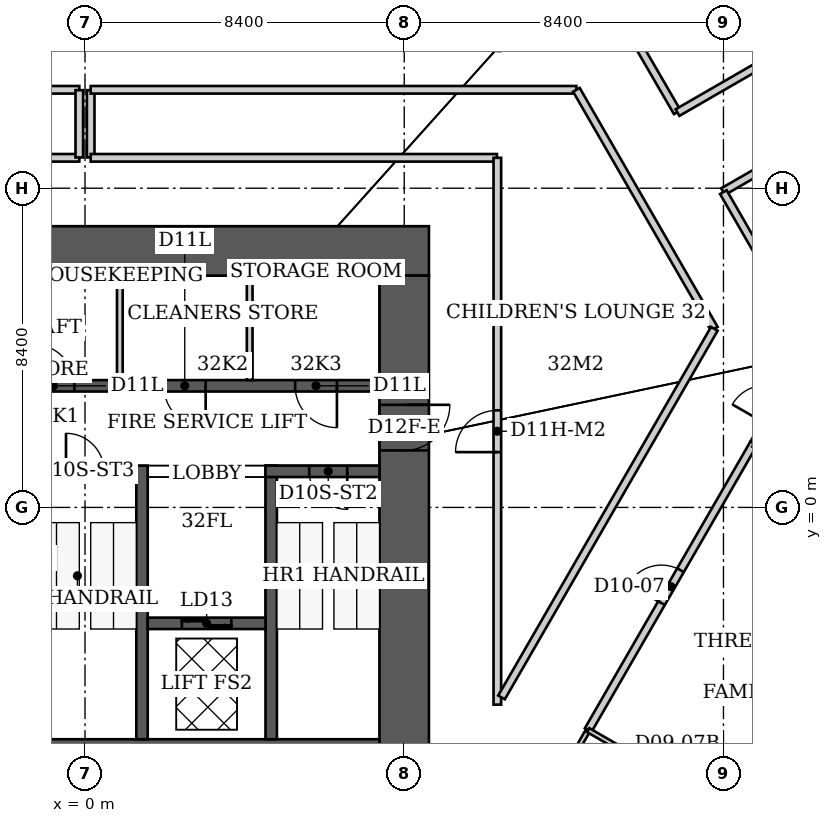
"""IFC4 building model, lengths in metres.
Left out: names, types, materials, properties, quantities, classifications, styles, units other than length and angle.
Written with IfcOpenShell. Run it as: python <this file> out.ifc"""

import sys

from ifc_helpers import new_model, si_unit, direction, frame, frame_2d, origin, place, context, subcontext, project, spatial, rectangle, extrude, element, fill, save


model = new_model("IFC4")
c1 = context("Model", 3, precision=1e-05, world=origin(), true_north=direction((0.0, 1.0)))
c2 = subcontext(c1, "Body", "Model", "MODEL_VIEW")
j1 = project(units=[si_unit("LENGTHUNIT", "METRE"), si_unit("PLANEANGLEUNIT", "RADIAN")], contexts=[c1])
p1 = place(None, origin())
s1 = spatial("IfcSite", under=j1, at=p1, CompositionType="ELEMENT")
p2 = place(p1, origin())
s2 = spatial("IfcBuilding", under=s1, at=p2, CompositionType="ELEMENT")
p3 = place(p2, frame((0.0, 0.0, 131.0)))
s3 = spatial("IfcBuildingStorey", under=s2, at=p3, CompositionType="ELEMENT", Elevation=131.0)
p4 = place(p3, frame((-9.05, 6.75, 0.0), z_axis=(0.0, 0.0, 1.0), x_axis=(1.0, 0.0, 0.0)))
e1 = element("IfcWall", 1, at=p4, inside=s3, PredefinedType="SHEAR", context=c2, shape_type="SweptSolid", body=[
    extrude(rectangle(XDim=18.1, YDim=1.3, at=frame_2d((9.05, 0.0))), origin(), (0.0, 0.0, 1.0), 3.8),
])
p5 = place(p3, frame((8.4, -9.2, 0.0), z_axis=(0.0, 0.0, 1.0), x_axis=(0.0, 1.0, 0.0)))
e2 = element("IfcWall", 2, at=p5, inside=s3, PredefinedType="SHEAR", context=c2, shape_type="SweptSolid", body=[
    extrude(rectangle(XDim=15.3, YDim=1.3, at=frame_2d((7.65, 0.0))), origin(), (0.0, 0.0, 1.0), 3.8),
])
p6 = place(p5, frame((10.7, 0.0, 0.0)))
e3 = element("IfcOpeningElement", 3, at=p6, cuts=e2, PredefinedType="OPENING", context=c2, shape_type="SweptSolid", body=[
    extrude(rectangle(XDim=1.2, YDim=2.2, at=frame_2d((0.6, 1.1))), frame((0.0, 0.65, 0.0), z_axis=(0.0, -1.0, 0.0), x_axis=(1.0, 0.0, 0.0)), (0.0, 0.0, 1.0), 1.3),
])
p7 = place(p3, frame((-7.75, -6.5, 0.0), z_axis=(0.0, 0.0, 1.0), x_axis=(1.0, 0.0, 0.0)))
e4 = element("IfcWall", 4, at=p7, inside=s3, PredefinedType="SHEAR", context=c2, shape_type="SweptSolid", body=[
    extrude(rectangle(XDim=15.5, YDim=0.8, at=frame_2d((7.75, 0.0))), origin(), (0.0, 0.0, 1.0), 3.8),
])
for number, where, z_axis, x_axis in (
    (5, (1.5, -6.1, 0.0), (0.0, 0.0, 1.0), (0.0, 1.0, 0.0)),
    (6, (4.9, -6.1, 0.0), (0.0, 0.0, 1.0), (0.0, 1.0, 0.0)),
):
    element("IfcWall", number, at=place(p3, frame(where, z_axis=z_axis, x_axis=x_axis)), inside=s3, PredefinedType="SHEAR", context=c2, shape_type="SweptSolid", body=[
        extrude(rectangle(XDim=7.2, YDim=0.3, at=frame_2d((3.6, 0.0))), origin(), (0.0, 0.0, 1.0), 3.8),
    ])
p8 = place(p3, frame((-1.35, 0.95, 0.0), z_axis=(0.0, 0.0, 1.0), x_axis=(1.0, 0.0, 0.0)))
e7 = element("IfcWall", 7, at=p8, inside=s3, PredefinedType="SHEAR", context=c2, shape_type="SweptSolid", body=[
    extrude(rectangle(XDim=2.7, YDim=0.3, at=frame_2d((1.35, 0.0))), origin(), (0.0, 0.0, 1.0), 3.8),
])
p9 = place(p8, frame((0.85, 0.0, 0.0)))
e8 = element("IfcOpeningElement", 8, at=p9, cuts=e7, PredefinedType="OPENING", context=c2, shape_type="SweptSolid", body=[
    extrude(rectangle(XDim=1.0, YDim=2.2, at=frame_2d((0.5, 1.1))), frame((0.0, 0.15, 0.0), z_axis=(0.0, -1.0, 0.0), x_axis=(1.0, 0.0, 0.0)), (0.0, 0.0, 1.0), 0.3),
])
p10 = place(p3, frame((4.75, 0.95, 0.0), z_axis=(0.0, 0.0, 1.0), x_axis=(1.0, 0.0, 0.0)))
e9 = element("IfcWall", 9, at=p10, inside=s3, PredefinedType="SHEAR", context=c2, shape_type="SweptSolid", body=[
    extrude(rectangle(XDim=3.0, YDim=0.3, at=frame_2d((1.5, 0.0))), origin(), (0.0, 0.0, 1.0), 3.8),
])
p11 = place(p10, frame((1.15, 0.0, 0.0)))
e10 = element("IfcOpeningElement", 10, at=p11, cuts=e9, PredefinedType="OPENING", context=c2, shape_type="SweptSolid", body=[
    extrude(rectangle(XDim=1.0, YDim=2.2, at=frame_2d((0.5, 1.1))), frame((0.0, 0.15, 0.0), z_axis=(0.0, -1.0, 0.0), x_axis=(1.0, 0.0, 0.0)), (0.0, 0.0, 1.0), 0.3),
])
p12 = place(p3, frame((1.65, -3.05, 0.0), z_axis=(0.0, 0.0, 1.0), x_axis=(1.0, 0.0, 0.0)))
e11 = element("IfcWall", 11, at=p12, inside=s3, PredefinedType="SHEAR", context=c2, shape_type="SweptSolid", body=[
    extrude(rectangle(XDim=3.1, YDim=0.3, at=frame_2d((1.55, 0.0))), origin(), (0.0, 0.0, 1.0), 3.8),
])
p13 = place(p12, frame((0.9, 0.0, 0.0)))
e12 = element("IfcOpeningElement", 12, at=p13, cuts=e11, PredefinedType="OPENING", context=c2, shape_type="SweptSolid", body=[
    extrude(rectangle(XDim=1.3, YDim=2.1, at=frame_2d((0.65, 1.05))), frame((0.0, 0.15, 0.0), z_axis=(0.0, -1.0, 0.0), x_axis=(1.0, 0.0, 0.0)), (0.0, 0.0, 1.0), 0.3),
])
p14 = place(p3, frame((-7.75, 3.2, 0.0), z_axis=(0.0, 0.0, 1.0), x_axis=(1.0, 0.0, 0.0)))
e13 = element("IfcWall", 13, at=p14, inside=s3, PredefinedType="SHEAR", context=c2, shape_type="SweptSolid", body=[
    extrude(rectangle(XDim=15.5, YDim=0.3, at=frame_2d((7.75, 0.0))), origin(), (0.0, 0.0, 1.0), 3.8),
])
p15 = place(p14, frame((6.371, 0.0, 0.0)))
e14 = element("IfcOpeningElement", 14, at=p15, cuts=e13, PredefinedType="OPENING", context=c2, shape_type="SweptSolid", body=[
    extrude(rectangle(XDim=1.1, YDim=2.2, at=frame_2d((0.55, 1.1))), frame((0.0, 0.15, 0.0), z_axis=(0.0, -1.0, 0.0), x_axis=(1.0, 0.0, 0.0)), (0.0, 0.0, 1.0), 0.3),
])
p16 = place(p14, frame((9.825, 0.0, 0.0)))
e15 = element("IfcOpeningElement", 15, at=p16, cuts=e13, PredefinedType="OPENING", context=c2, shape_type="SweptSolid", body=[
    extrude(rectangle(XDim=1.1, YDim=2.2, at=frame_2d((0.55, 1.1))), frame((0.0, 0.15, 0.0), z_axis=(0.0, -1.0, 0.0), x_axis=(1.0, 0.0, 0.0)), (0.0, 0.0, 1.0), 0.3),
])
p17 = place(p14, frame((13.279, 0.0, 0.0)))
e16 = element("IfcOpeningElement", 16, at=p17, cuts=e13, PredefinedType="OPENING", context=c2, shape_type="SweptSolid", body=[
    extrude(rectangle(XDim=1.1, YDim=2.2, at=frame_2d((0.55, 1.1))), frame((0.0, 0.15, 0.0), z_axis=(0.0, -1.0, 0.0), x_axis=(1.0, 0.0, 0.0)), (0.0, 0.0, 1.0), 0.3),
])
p18 = place(p3, frame((-10.62, 10.99, 0.0), z_axis=(0.0, 0.0, 1.0), x_axis=(1.0, 0.0, 0.0)))
e17 = element("IfcWall", 17, at=p18, inside=s3, PredefinedType="PARTITIONING", context=c2, shape_type="SweptSolid", body=[
    extrude(rectangle(XDim=10.47, YDim=0.2, at=frame_2d((5.235, 0.0))), origin(), (0.0, 0.0, 1.0), 3.64),
])
p19 = place(p3, frame((-0.15, 9.2, 0.0), z_axis=(0.0, 0.0, 1.0), x_axis=(-1.0, 0.0, 0.0)))
e18 = element("IfcWall", 18, at=p19, inside=s3, PredefinedType="PARTITIONING", context=c2, shape_type="SweptSolid", body=[
    extrude(rectangle(XDim=10.69, YDim=0.2, at=frame_2d((5.345, 0.0))), origin(), (0.0, 0.0, 1.0), 3.64),
])
for number, where, z_axis, x_axis in (
    (19, (-0.15, 10.98, 0.0), (0.0, 0.0, 1.0), (0.0, -1.0, 0.0)),
    (20, (0.15, 9.21, 0.0), (0.0, 0.0, 1.0), (0.0, 1.0, 0.0)),
):
    element("IfcWall", number, at=place(p3, frame(where, z_axis=z_axis, x_axis=x_axis)), inside=s3, PredefinedType="PARTITIONING", context=c2, shape_type="SweptSolid", body=[
        extrude(rectangle(XDim=1.77, YDim=0.2, at=frame_2d((0.885, 0.0))), origin(), (0.0, 0.0, 1.0), 3.64),
    ])
p20 = place(p3, frame((0.15, 10.99, 0.0), z_axis=(0.0, 0.0, 1.0), x_axis=(1.0, 0.0, 0.0)))
e21 = element("IfcWall", 21, at=p20, inside=s3, PredefinedType="PARTITIONING", context=c2, shape_type="SweptSolid", body=[
    extrude(rectangle(XDim=12.78, YDim=0.2, at=frame_2d((6.39, 0.0))), origin(), (0.0, 0.0, 1.0), 3.64),
])
p21 = place(p3, frame((10.84, 9.2, 0.0), z_axis=(0.0, 0.0, 1.0), x_axis=(-1.0, 0.0, 0.0)))
e22 = element("IfcWall", 22, at=p21, inside=s3, PredefinedType="PARTITIONING", context=c2, shape_type="SweptSolid", body=[
    extrude(rectangle(XDim=10.69, YDim=0.2, at=frame_2d((5.345, 0.0))), origin(), (0.0, 0.0, 1.0), 3.64),
])
p22 = place(p3, frame((10.85, -5.19, 0.0), z_axis=(0.0, 0.0, 1.0), x_axis=(0.0, 1.0, 0.0)))
e23 = element("IfcWall", 23, at=p22, inside=s3, PredefinedType="PARTITIONING", context=c2, shape_type="SweptSolid", body=[
    extrude(rectangle(XDim=14.39, YDim=0.2, at=frame_2d((7.195, 0.0))), origin(), (0.0, 0.0, 1.0), 3.64),
])
p23 = place(p22, frame((6.645, 0.0, 0.0)))
e24 = element("IfcOpeningElement", 24, at=p23, cuts=e23, PredefinedType="OPENING", context=c2, shape_type="SweptSolid", body=[
    extrude(rectangle(XDim=1.1, YDim=2.2, at=frame_2d((0.55, 1.1))), frame((0.0, 0.1, 0.0), z_axis=(0.0, -1.0, 0.0), x_axis=(1.0, 0.0, 0.0)), (0.0, 0.0, 1.0), 0.2),
])
p24 = place(p3, frame((12.04, -7.94, 0.0), z_axis=(0.0, 0.0, 1.0), x_axis=(0.499737123639, 0.866177122335, 0.0)))
e25 = element("IfcWall", 25, at=p24, inside=s3, PredefinedType="PARTITIONING", context=c2, shape_type="SweptSolid", body=[
    extrude(rectangle(XDim=2.401, YDim=0.12, at=frame_2d((1.201, 0.0))), origin(), (0.0, 0.0, 1.0), 3.64),
])
p25 = place(p3, frame((12.93, 10.99, 0.0), z_axis=(0.0, 0.0, 1.0), x_axis=(0.4998524389, -0.866110581465, 0.0)))
e26 = element("IfcWall", 26, at=p25, inside=s3, PredefinedType="PARTITIONING", context=c2, shape_type="SweptSolid", body=[
    extrude(rectangle(XDim=7.262, YDim=0.2, at=frame_2d((3.631, 0.0))), origin(), (0.0, 0.0, 1.0), 3.64),
])
p26 = place(p3, frame((13.24, -5.86, 0.0), z_axis=(0.0, 0.0, 1.0), x_axis=(0.500093306236, 0.865971526701, 0.0)))
e27 = element("IfcWall", 27, at=p26, inside=s3, PredefinedType="PARTITIONING", context=c2, shape_type="SweptSolid", body=[
    extrude(rectangle(XDim=8.719, YDim=0.2, at=frame_2d((4.359, 0.0))), origin(), (0.0, 0.0, 1.0), 3.64),
])
p27 = place(p26, frame((3.859, 0.0, 0.0)))
e28 = element("IfcOpeningElement", 28, at=p27, cuts=e27, PredefinedType="OPENING", context=c2, shape_type="SweptSolid", body=[
    extrude(rectangle(XDim=1.0, YDim=2.13, at=frame_2d((0.5, 1.065))), frame((0.0, 0.1, 0.0), z_axis=(0.0, -1.0, 0.0), x_axis=(1.0, 0.0, 0.0)), (0.0, 0.0, 1.0), 0.2),
])
p28 = place(p3, frame((15.16, -6.97, 0.0), z_axis=(0.0, 0.0, 1.0), x_axis=(-0.865705017107, 0.500554515868, 0.0)))
e29 = element("IfcWall", 29, at=p28, inside=s3, PredefinedType="PARTITIONING", context=c2, shape_type="SweptSolid", body=[
    extrude(rectangle(XDim=2.218, YDim=0.12, at=frame_2d((1.109, 0.0))), origin(), (0.0, 0.0, 1.0), 3.64),
])
p29 = place(p3, frame((15.585, 10.399, 0.0), z_axis=(0.0, 0.0, 1.0), x_axis=(-0.502198411801, 0.864752424214, 0.0)))
e30 = element("IfcWall", 30, at=p29, inside=s3, PredefinedType="PARTITIONING", context=c2, shape_type="SweptSolid", body=[
    extrude(rectangle(XDim=2.997, YDim=0.2, at=frame_2d((1.498, 0.0))), origin(), (0.0, 0.0, 1.0), 3.64),
])
p30 = place(p3, frame((16.56, 4.7, 0.0), z_axis=(0.0, 0.0, 1.0), x_axis=(-0.500007375767, -0.866021145342, 0.0)))
e31 = element("IfcWall", 31, at=p30, inside=s3, PredefinedType="PARTITIONING", context=c2, shape_type="SweptSolid", body=[
    extrude(rectangle(XDim=11.2, YDim=0.2, at=frame_2d((5.6, 0.0))), origin(), (0.0, 0.0, 1.0), 3.64),
])
p31 = place(p3, frame((16.79, 8.31, 0.0), z_axis=(0.0, 0.0, 1.0), x_axis=(0.866106622958, 0.499859297871, 0.0)))
e32 = element("IfcWall", 32, at=p31, inside=s3, PredefinedType="PARTITIONING", context=c2, shape_type="SweptSolid", body=[
    extrude(rectangle(XDim=9.472, YDim=0.2, at=frame_2d((4.736, 0.0))), origin(), (0.0, 0.0, 1.0), 3.64),
])
p32 = place(p31, frame((4.186, 0.0, 0.0)))
e33 = element("IfcOpeningElement", 33, at=p32, cuts=e32, PredefinedType="OPENING", context=c2, shape_type="SweptSolid", body=[
    extrude(rectangle(XDim=1.1, YDim=2.2, at=frame_2d((0.55, 1.1))), frame((0.0, 0.1, 0.0), z_axis=(0.0, -1.0, 0.0), x_axis=(1.0, 0.0, 0.0)), (0.0, 0.0, 1.0), 0.2),
])
p33 = place(p3, frame((17.6, 1.69, 0.0), z_axis=(0.0, 0.0, 1.0), x_axis=(0.498987132006, 0.866609394187, 0.0)))
e34 = element("IfcWall", 34, at=p33, inside=s3, PredefinedType="PARTITIONING", context=c2, shape_type="SweptSolid", body=[
    extrude(rectangle(XDim=2.204, YDim=0.2, at=frame_2d((1.102, 0.0))), origin(), (0.0, 0.0, 1.0), 3.64),
])
p34 = place(p33, frame((0.602, 0.0, 0.0)))
e35 = element("IfcOpeningElement", 35, at=p34, cuts=e34, PredefinedType="OPENING", context=c2, shape_type="SweptSolid", body=[
    extrude(rectangle(XDim=1.0, YDim=2.13, at=frame_2d((0.5, 1.065))), frame((0.0, 0.1, 0.0), z_axis=(0.0, -1.0, 0.0), x_axis=(1.0, 0.0, 0.0)), (0.0, 0.0, 1.0), 0.2),
])
p35 = place(p3, frame((19.1, 4.3, 0.0), z_axis=(0.0, 0.0, 1.0), x_axis=(-0.499190874865, 0.866492048695, 0.0)))
e36 = element("IfcWall", 36, at=p35, inside=s3, PredefinedType="PARTITIONING", context=c2, shape_type="SweptSolid", body=[
    extrude(rectangle(XDim=4.613, YDim=0.2, at=frame_2d((2.307, 0.0))), origin(), (0.0, 0.0, 1.0), 3.64),
])
p36 = place(p3, frame((23.794, 15.125, 0.0), z_axis=(0.0, 0.0, 1.0), x_axis=(-0.866089024064, -0.499889790249, 0.0)))
e37 = element("IfcWall", 37, at=p36, inside=s3, PredefinedType="PARTITIONING", context=c2, shape_type="SweptSolid", body=[
    extrude(rectangle(XDim=9.472, YDim=0.2, at=frame_2d((4.736, 0.0))), origin(), (0.0, 0.0, 1.0), 3.64),
])
p37 = place(p36, frame((4.186, 0.0, 0.0)))
e38 = element("IfcOpeningElement", 38, at=p37, cuts=e37, PredefinedType="OPENING", context=c2, shape_type="SweptSolid", body=[
    extrude(rectangle(XDim=1.1, YDim=2.2, at=frame_2d((0.55, 1.1))), frame((0.0, 0.1, 0.0), z_axis=(0.0, -1.0, 0.0), x_axis=(1.0, 0.0, 0.0)), (0.0, 0.0, 1.0), 0.2),
])
p38 = place(p3, frame((24.506, -2.29, 0.0), z_axis=(0.0, 0.0, 1.0), x_axis=(-0.866414224119, 0.499325937884, 0.0)))
e39 = element("IfcWall", 39, at=p38, inside=s3, PredefinedType="PARTITIONING", context=c2, shape_type="SweptSolid", body=[
    extrude(rectangle(XDim=7.961, YDim=0.2, at=frame_2d((3.98, 0.0))), origin(), (0.0, 0.0, 1.0), 3.64),
])
for number, where, z_axis, x_axis in (
    (40, (0.917, 3.35, 0.0), (0.0, 0.0, 1.0), (0.0, 1.0, 0.0)),
    (41, (4.333, 3.35, 0.0), (0.0, 0.0, 1.0), (0.0, 1.0, 0.0)),
):
    element("IfcWall", number, at=place(p3, frame(where, z_axis=z_axis, x_axis=x_axis)), inside=s3, PredefinedType="PARTITIONING", context=c2, shape_type="SweptSolid", body=[
        extrude(rectangle(XDim=2.75, YDim=0.15, at=frame_2d((1.375, 0.0))), origin(), (0.0, 0.0, 1.0), 3.64),
    ])
p39 = place(p27, origin())
e42 = element("IfcDoor", 42, at=p39, inside=s3, OperationType="SINGLE_SWING_LEFT", PredefinedType="DOOR", context=c2, shape_type="SweptSolid", body=[
    extrude(rectangle(XDim=1.0, YDim=2.13, at=frame_2d((0.5, 1.065))), frame((0.0, 0.025, 0.0), z_axis=(0.0, -1.0, 0.0), x_axis=(1.0, 0.0, 0.0)), (0.0, 0.0, 1.0), 0.05),
])
fill(e28, e42)
p40 = place(p23, origin())
e43 = element("IfcDoor", 43, at=p40, inside=s3, OperationType="SINGLE_SWING_LEFT", PredefinedType="DOOR", context=c2, shape_type="SweptSolid", body=[
    extrude(rectangle(XDim=1.1, YDim=2.2, at=frame_2d((0.55, 1.1))), frame((0.0, 0.025, 0.0), z_axis=(0.0, -1.0, 0.0), x_axis=(1.0, 0.0, 0.0)), (0.0, 0.0, 1.0), 0.05),
])
fill(e24, e43)
p41 = place(p9, origin())
e44 = element("IfcDoor", 44, at=p41, inside=s3, OperationType="SINGLE_SWING_LEFT", PredefinedType="DOOR", context=c2, shape_type="SweptSolid", body=[
    extrude(rectangle(XDim=1.0, YDim=2.2, at=frame_2d((0.5, 1.1))), frame((0.0, 0.025, 0.0), z_axis=(0.0, -1.0, 0.0), x_axis=(1.0, 0.0, 0.0)), (0.0, 0.0, 1.0), 0.05),
])
fill(e8, e44)
p42 = place(p11, origin())
e45 = element("IfcDoor", 45, at=p42, inside=s3, OperationType="SINGLE_SWING_RIGHT", PredefinedType="DOOR", context=c2, shape_type="SweptSolid", body=[
    extrude(rectangle(XDim=1.0, YDim=2.2, at=frame_2d((0.5, 1.1))), frame((0.0, 0.025, 0.0), z_axis=(0.0, -1.0, 0.0), x_axis=(1.0, 0.0, 0.0)), (0.0, 0.0, 1.0), 0.05),
])
fill(e10, e45)
p43 = place(p6, origin())
e46 = element("IfcDoor", 46, at=p43, inside=s3, OperationType="SINGLE_SWING_RIGHT", PredefinedType="DOOR", context=c2, shape_type="SweptSolid", body=[
    extrude(rectangle(XDim=1.2, YDim=2.2, at=frame_2d((0.6, 1.1))), frame((0.0, 0.025, 0.0), z_axis=(0.0, -1.0, 0.0), x_axis=(1.0, 0.0, 0.0)), (0.0, 0.0, 1.0), 0.05),
])
fill(e3, e46)
p44 = place(p15, origin())
e47 = element("IfcDoor", 47, at=p44, inside=s3, OperationType="SINGLE_SWING_LEFT", PredefinedType="DOOR", context=c2, shape_type="SweptSolid", body=[
    extrude(rectangle(XDim=1.1, YDim=2.2, at=frame_2d((0.55, 1.1))), frame((0.0, 0.025, 0.0), z_axis=(0.0, -1.0, 0.0), x_axis=(1.0, 0.0, 0.0)), (0.0, 0.0, 1.0), 0.05),
])
fill(e14, e47)
p45 = place(p16, origin())
e48 = element("IfcDoor", 48, at=p45, inside=s3, OperationType="SINGLE_SWING_RIGHT", PredefinedType="DOOR", context=c2, shape_type="SweptSolid", body=[
    extrude(rectangle(XDim=1.1, YDim=2.2, at=frame_2d((0.55, 1.1))), frame((0.0, 0.025, 0.0), z_axis=(0.0, -1.0, 0.0), x_axis=(1.0, 0.0, 0.0)), (0.0, 0.0, 1.0), 0.05),
])
fill(e15, e48)
p46 = place(p17, origin())
e49 = element("IfcDoor", 49, at=p46, inside=s3, OperationType="SINGLE_SWING_RIGHT", PredefinedType="DOOR", context=c2, shape_type="SweptSolid", body=[
    extrude(rectangle(XDim=1.1, YDim=2.2, at=frame_2d((0.55, 1.1))), frame((0.0, 0.025, 0.0), z_axis=(0.0, -1.0, 0.0), x_axis=(1.0, 0.0, 0.0)), (0.0, 0.0, 1.0), 0.05),
])
fill(e16, e49)
p47 = place(p13, origin())
e50 = element("IfcDoor", 50, at=p47, inside=s3, OperationType="DOUBLE_DOOR_SLIDING", PredefinedType="DOOR", context=c2, shape_type="SweptSolid", body=[
    extrude(rectangle(XDim=1.3, YDim=2.1, at=frame_2d((0.65, 1.05))), frame((0.0, 0.025, 0.0), z_axis=(0.0, -1.0, 0.0), x_axis=(1.0, 0.0, 0.0)), (0.0, 0.0, 1.0), 0.05),
])
fill(e12, e50)
save(model, sys.argv[1])
